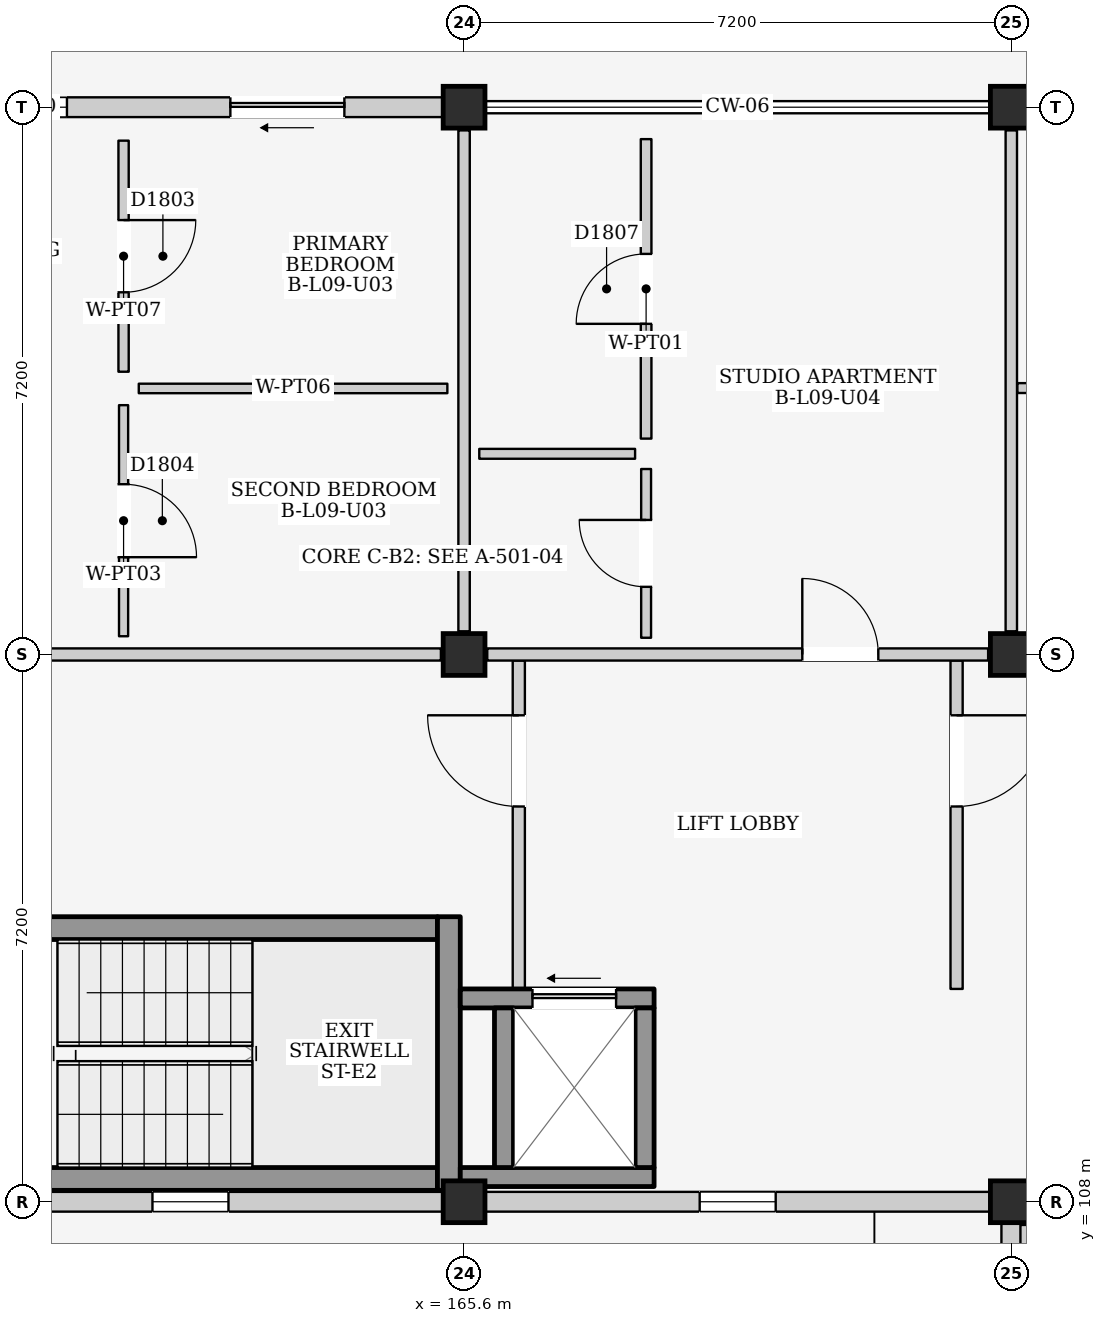
"""IFC4 building model, lengths in metres.
Left out: names, types, materials, properties, quantities, classifications, styles, units other than length and angle.
Written with IfcOpenShell. Run it as: python <this file> out.ifc"""

import sys

from ifc_helpers import new_model, si_unit, direction, frame, frame_2d, origin, origin_2d, place, context, subcontext, project, spatial, rectangle, extrude, element, fill, save


model = new_model("IFC4")
c1 = context("Model", 3, precision=1e-05, world=origin(), true_north=direction((0.0, 1.0)))
c2 = subcontext(c1, "Body", "Model", "MODEL_VIEW")
j1 = project(units=[si_unit("LENGTHUNIT", "METRE"), si_unit("PLANEANGLEUNIT", "RADIAN")], contexts=[c1])
p1 = place(None, origin())
s1 = spatial("IfcSite", under=j1, at=p1, CompositionType="ELEMENT")
p2 = place(p1, origin())
s2 = spatial("IfcBuilding", under=s1, at=p2, CompositionType="ELEMENT")
p3 = place(p2, frame((0.0, 0.0, 31.5)))
s3 = spatial("IfcBuildingStorey", under=s2, at=p3, CompositionType="ELEMENT", Elevation=31.5)
for number, where, z_axis, x_axis in (
    (1, (165.6, 108.0, 0.0), (0.0, 0.0, 1.0), (1.0, 0.0, 0.0)),
    (2, (165.6, 115.2, 0.0), (0.0, 0.0, 1.0), (1.0, 0.0, 0.0)),
    (3, (165.6, 122.4, 0.0), (0.0, 0.0, 1.0), (1.0, 0.0, 0.0)),
    (4, (172.8, 108.0, 0.0), (0.0, 0.0, 1.0), (1.0, 0.0, 0.0)),
    (5, (172.8, 115.2, 0.0), (0.0, 0.0, 1.0), (1.0, 0.0, 0.0)),
    (6, (172.8, 122.4, 0.0), (0.0, 0.0, 1.0), (1.0, 0.0, 0.0)),
):
    element("IfcColumn", number, at=place(p3, frame(where, z_axis=z_axis, x_axis=x_axis)), inside=s3, PredefinedType="COLUMN", context=c2, shape_type="SweptSolid", body=[
        extrude(rectangle(XDim=0.55, YDim=0.55, at=origin_2d()), origin(), (0.0, 0.0, 1.0), 3.3),
    ])
p4 = place(p3, frame((158.675, 108.0, 0.0), z_axis=(0.0, 0.0, 1.0), x_axis=(1.0, 0.0, 0.0)))
e7 = element("IfcWall", 7, at=p4, inside=s3, PredefinedType="ELEMENTEDWALL", context=c2, shape_type="SweptSolid", body=[
    extrude(rectangle(XDim=6.65, YDim=0.26, at=frame_2d((3.325, 0.0))), origin(), (0.0, 0.0, 1.0), 2.465),
])
p5 = place(p4, frame((2.825, 0.0, 1.2)))
e8 = element("IfcOpeningElement", 8, at=p5, cuts=e7, PredefinedType="OPENING", context=c2, shape_type="SweptSolid", body=[
    extrude(rectangle(XDim=1.0, YDim=0.9, at=frame_2d((0.5, 0.45))), frame((0.0, 0.145, 0.0), z_axis=(0.0, -1.0, 0.0), x_axis=(1.0, 0.0, 0.0)), (0.0, 0.0, 1.0), 0.29),
])
p6 = place(p3, frame((158.675, 122.4, 0.0), z_axis=(0.0, 0.0, 1.0), x_axis=(1.0, 0.0, 0.0)))
e9 = element("IfcWall", 9, at=p6, inside=s3, PredefinedType="ELEMENTEDWALL", context=c2, shape_type="SweptSolid", body=[
    extrude(rectangle(XDim=6.65, YDim=0.26, at=frame_2d((3.325, 0.0))), origin(), (0.0, 0.0, 1.0), 2.615),
])
p7 = place(p6, frame((3.85, 0.0, 0.0)))
e10 = element("IfcOpeningElement", 10, at=p7, cuts=e9, PredefinedType="OPENING", context=c2, shape_type="SweptSolid", body=[
    extrude(rectangle(XDim=1.5, YDim=2.12, at=frame_2d((0.75, 1.06))), frame((0.0, 0.145, 0.0), z_axis=(0.0, -1.0, 0.0), x_axis=(1.0, 0.0, 0.0)), (0.0, 0.0, 1.0), 0.29),
])
p8 = place(p6, frame((0.55, 0.0, 0.9)))
e11 = element("IfcOpeningElement", 11, at=p8, cuts=e9, PredefinedType="OPENING", context=c2, shape_type="SweptSolid", body=[
    extrude(rectangle(XDim=1.15, YDim=1.15, at=frame_2d((0.575, 0.575))), frame((0.0, 0.145, 0.0), z_axis=(0.0, -1.0, 0.0), x_axis=(1.0, 0.0, 0.0)), (0.0, 0.0, 1.0), 0.29),
])
p9 = place(p3, frame((165.875, 108.0, 0.0), z_axis=(0.0, 0.0, 1.0), x_axis=(1.0, 0.0, 0.0)))
e12 = element("IfcWall", 12, at=p9, inside=s3, PredefinedType="ELEMENTEDWALL", context=c2, shape_type="SweptSolid", body=[
    extrude(rectangle(XDim=6.65, YDim=0.26, at=frame_2d((3.325, 0.0))), origin(), (0.0, 0.0, 1.0), 2.465),
])
p10 = place(p9, frame((2.825, 0.0, 1.2)))
e13 = element("IfcOpeningElement", 13, at=p10, cuts=e12, PredefinedType="OPENING", context=c2, shape_type="SweptSolid", body=[
    extrude(rectangle(XDim=1.0, YDim=0.9, at=frame_2d((0.5, 0.45))), frame((0.0, 0.145, 0.0), z_axis=(0.0, -1.0, 0.0), x_axis=(1.0, 0.0, 0.0)), (0.0, 0.0, 1.0), 0.29),
])
p11 = place(p3, frame((172.8, 101.075, 0.0), z_axis=(0.0, 0.0, 1.0), x_axis=(0.0, 1.0, 0.0)))
e14 = element("IfcWall", 14, at=p11, inside=s3, PredefinedType="ELEMENTEDWALL", context=c2, shape_type="SweptSolid", body=[
    extrude(rectangle(XDim=6.65, YDim=0.26, at=frame_2d((3.325, 0.0))), origin(), (0.0, 0.0, 1.0), 2.565),
])
p12 = place(p11, frame((2.5, 0.0, 0.0)))
e15 = element("IfcOpeningElement", 15, at=p12, cuts=e14, PredefinedType="OPENING", context=c2, shape_type="SweptSolid", body=[
    extrude(rectangle(XDim=1.4, YDim=2.1, at=frame_2d((0.7, 1.05))), frame((0.0, 0.145, 0.0), z_axis=(0.0, -1.0, 0.0), x_axis=(1.0, 0.0, 0.0)), (0.0, 0.0, 1.0), 0.29),
])
p13 = place(p3, frame((158.75, 108.3, 0.0), z_axis=(0.0, 0.0, 1.0), x_axis=(1.0, 0.0, 0.0)))
e16 = element("IfcWall", 16, at=p13, inside=s3, PredefinedType="SHEAR", context=c2, shape_type="SweptSolid", body=[
    extrude(rectangle(XDim=6.5, YDim=0.3, at=frame_2d((3.25, 0.0))), origin(), (0.0, 0.0, 1.0), 3.08),
])
p14 = place(p3, frame((158.75, 111.6, 0.0), z_axis=(0.0, 0.0, 1.0), x_axis=(1.0, 0.0, 0.0)))
e17 = element("IfcWall", 17, at=p14, inside=s3, PredefinedType="SHEAR", context=c2, shape_type="SweptSolid", body=[
    extrude(rectangle(XDim=6.5, YDim=0.3, at=frame_2d((3.25, 0.0))), origin(), (0.0, 0.0, 1.0), 3.08),
])
p15 = place(p14, frame((0.18, 0.0, 0.0)))
e18 = element("IfcOpeningElement", 18, at=p15, cuts=e17, PredefinedType="OPENING", context=c2, shape_type="SweptSolid", body=[
    extrude(rectangle(XDim=1.15, YDim=2.2, at=frame_2d((0.575, 1.1))), frame((0.0, 0.165, 0.0), z_axis=(0.0, -1.0, 0.0), x_axis=(1.0, 0.0, 0.0)), (0.0, 0.0, 1.0), 0.33),
])
p16 = place(p3, frame((165.4, 108.15, 0.0), z_axis=(0.0, 0.0, 1.0), x_axis=(0.0, 1.0, 0.0)))
e19 = element("IfcWall", 19, at=p16, inside=s3, PredefinedType="SHEAR", context=c2, shape_type="SweptSolid", body=[
    extrude(rectangle(XDim=3.6, YDim=0.3, at=frame_2d((1.8, 0.0))), origin(), (0.0, 0.0, 1.0), 3.08),
])
p17 = place(p3, frame((166.32, 110.8, 0.0), z_axis=(0.0, 0.0, 1.0), x_axis=(0.0, 1.0, 0.0)))
e20 = element("IfcWall", 20, at=p17, inside=s3, PredefinedType="PARTITIONING", context=c2, shape_type="SweptSolid", body=[
    extrude(rectangle(XDim=4.32, YDim=0.16, at=frame_2d((2.16, 0.0))), origin(), (0.0, 0.0, 1.0), 3.08),
])
p18 = place(p17, frame((2.4, 0.0, 0.0)))
e21 = element("IfcOpeningElement", 21, at=p18, cuts=e20, PredefinedType="OPENING", context=c2, shape_type="SweptSolid", body=[
    extrude(rectangle(XDim=1.2, YDim=2.2, at=frame_2d((0.6, 1.1))), frame((0.0, 0.095, 0.0), z_axis=(0.0, -1.0, 0.0), x_axis=(1.0, 0.0, 0.0)), (0.0, 0.0, 1.0), 0.19),
])
p19 = place(p3, frame((172.08, 110.8, 0.0), z_axis=(0.0, 0.0, 1.0), x_axis=(0.0, 1.0, 0.0)))
e22 = element("IfcWall", 22, at=p19, inside=s3, PredefinedType="PARTITIONING", context=c2, shape_type="SweptSolid", body=[
    extrude(rectangle(XDim=4.32, YDim=0.16, at=frame_2d((2.16, 0.0))), origin(), (0.0, 0.0, 1.0), 3.08),
])
p20 = place(p19, frame((2.4, 0.0, 0.0)))
e23 = element("IfcOpeningElement", 23, at=p20, cuts=e22, PredefinedType="OPENING", context=c2, shape_type="SweptSolid", body=[
    extrude(rectangle(XDim=1.2, YDim=2.2, at=frame_2d((0.6, 1.1))), frame((0.0, 0.095, 0.0), z_axis=(0.0, -1.0, 0.0), x_axis=(1.0, 0.0, 0.0)), (0.0, 0.0, 1.0), 0.19),
])
p21 = place(p3, frame((165.55, 108.325, 0.0), z_axis=(0.0, 0.0, 1.0), x_axis=(1.0, 0.0, 0.0)))
e24 = element("IfcWall", 24, at=p21, inside=s3, PredefinedType="SHEAR", context=c2, shape_type="SweptSolid", body=[
    extrude(rectangle(XDim=2.55, YDim=0.25, at=frame_2d((1.275, 0.0))), origin(), (0.0, 0.0, 1.0), 3.08),
])
p22 = place(p3, frame((165.55, 110.675, 0.0), z_axis=(0.0, 0.0, 1.0), x_axis=(1.0, 0.0, 0.0)))
e25 = element("IfcWall", 25, at=p22, inside=s3, PredefinedType="SHEAR", context=c2, shape_type="SweptSolid", body=[
    extrude(rectangle(XDim=2.55, YDim=0.25, at=frame_2d((1.275, 0.0))), origin(), (0.0, 0.0, 1.0), 3.08),
])
p23 = place(p22, frame((0.95, 0.0, 0.0)))
e26 = element("IfcOpeningElement", 26, at=p23, cuts=e25, PredefinedType="OPENING", context=c2, shape_type="SweptSolid", body=[
    extrude(rectangle(XDim=1.1, YDim=2.15, at=frame_2d((0.55, 1.075))), frame((0.0, 0.14, 0.0), z_axis=(0.0, -1.0, 0.0), x_axis=(1.0, 0.0, 0.0)), (0.0, 0.0, 1.0), 0.28),
])
for number, where, z_axis, x_axis in (
    (27, (166.125, 108.45, 0.0), (0.0, 0.0, 1.0), (0.0, 1.0, 0.0)),
    (28, (167.975, 108.45, 0.0), (0.0, 0.0, 1.0), (0.0, 1.0, 0.0)),
):
    element("IfcWall", number, at=place(p3, frame(where, z_axis=z_axis, x_axis=x_axis)), inside=s3, PredefinedType="SHEAR", context=c2, shape_type="SweptSolid", body=[
        extrude(rectangle(XDim=2.1, YDim=0.25, at=frame_2d((1.05, 0.0))), origin(), (0.0, 0.0, 1.0), 3.08),
    ])
p24 = place(p3, frame((158.705, 115.2, 0.0), z_axis=(0.0, 0.0, 1.0), x_axis=(1.0, 0.0, 0.0)))
e29 = element("IfcWall", 29, at=p24, inside=s3, PredefinedType="PARTITIONING", context=c2, shape_type="SweptSolid", body=[
    extrude(rectangle(XDim=6.59, YDim=0.16, at=frame_2d((3.295, 0.0))), origin(), (0.0, 0.0, 1.0), 2.465),
])
p25 = place(p3, frame((165.6, 115.505, 0.0), z_axis=(0.0, 0.0, 1.0), x_axis=(0.0, 1.0, 0.0)))
e30 = element("IfcWall", 30, at=p25, inside=s3, PredefinedType="PARTITIONING", context=c2, shape_type="SweptSolid", body=[
    extrude(rectangle(XDim=6.59, YDim=0.15, at=frame_2d((3.295, 0.0))), origin(), (0.0, 0.0, 1.0), 2.565),
])
p26 = place(p3, frame((161.12, 118.92, 0.0), z_axis=(0.0, 0.0, 1.0), x_axis=(0.0, 1.0, 0.0)))
e31 = element("IfcWall", 31, at=p26, inside=s3, PredefinedType="PARTITIONING", context=c2, shape_type="SweptSolid", body=[
    extrude(rectangle(XDim=3.04, YDim=0.135, at=frame_2d((1.52, 0.0))), origin(), (0.0, 0.0, 1.0), 3.08),
])
p27 = place(p26, frame((1.045, 0.0, 0.0)))
e32 = element("IfcOpeningElement", 32, at=p27, cuts=e31, PredefinedType="OPENING", context=c2, shape_type="SweptSolid", body=[
    extrude(rectangle(XDim=0.95, YDim=2.15, at=frame_2d((0.475, 1.075))), frame((0.0, 0.083, 0.0), z_axis=(0.0, -1.0, 0.0), x_axis=(1.0, 0.0, 0.0)), (0.0, 0.0, 1.0), 0.165),
])
p28 = place(p3, frame((161.32, 118.7, 0.0), z_axis=(0.0, 0.0, 1.0), x_axis=(1.0, 0.0, 0.0)))
e33 = element("IfcWall", 33, at=p28, inside=s3, PredefinedType="PARTITIONING", context=c2, shape_type="SweptSolid", body=[
    extrude(rectangle(XDim=4.06, YDim=0.125, at=frame_2d((2.03, 0.0))), origin(), (0.0, 0.0, 1.0), 3.08),
])
p29 = place(p3, frame((161.12, 115.44, 0.0), z_axis=(0.0, 0.0, 1.0), x_axis=(0.0, 1.0, 0.0)))
e34 = element("IfcWall", 34, at=p29, inside=s3, PredefinedType="PARTITIONING", context=c2, shape_type="SweptSolid", body=[
    extrude(rectangle(XDim=3.04, YDim=0.12, at=frame_2d((1.52, 0.0))), origin(), (0.0, 0.0, 1.0), 3.08),
])
p30 = place(p29, frame((1.04, 0.0, 0.0)))
e35 = element("IfcOpeningElement", 35, at=p30, cuts=e34, PredefinedType="OPENING", context=c2, shape_type="SweptSolid", body=[
    extrude(rectangle(XDim=0.96, YDim=2.15, at=frame_2d((0.48, 1.075))), frame((0.0, 0.075, 0.0), z_axis=(0.0, -1.0, 0.0), x_axis=(1.0, 0.0, 0.0)), (0.0, 0.0, 1.0), 0.15),
])
p31 = place(p3, frame((165.905, 115.2, 0.0), z_axis=(0.0, 0.0, 1.0), x_axis=(1.0, 0.0, 0.0)))
e36 = element("IfcWall", 36, at=p31, inside=s3, PredefinedType="PARTITIONING", context=c2, shape_type="SweptSolid", body=[
    extrude(rectangle(XDim=6.59, YDim=0.16, at=frame_2d((3.295, 0.0))), origin(), (0.0, 0.0, 1.0), 2.465),
])
p32 = place(p31, frame((4.145, 0.0, 0.0)))
e37 = element("IfcOpeningElement", 37, at=p32, cuts=e36, PredefinedType="OPENING", context=c2, shape_type="SweptSolid", body=[
    extrude(rectangle(XDim=1.0, YDim=2.15, at=frame_2d((0.5, 1.075))), frame((0.0, 0.095, 0.0), z_axis=(0.0, -1.0, 0.0), x_axis=(1.0, 0.0, 0.0)), (0.0, 0.0, 1.0), 0.19),
])
p33 = place(p3, frame((172.8, 115.505, 0.0), z_axis=(0.0, 0.0, 1.0), x_axis=(0.0, 1.0, 0.0)))
e38 = element("IfcWall", 38, at=p33, inside=s3, PredefinedType="PARTITIONING", context=c2, shape_type="SweptSolid", body=[
    extrude(rectangle(XDim=6.59, YDim=0.15, at=frame_2d((3.295, 0.0))), origin(), (0.0, 0.0, 1.0), 2.565),
])
p34 = place(p3, frame((165.8, 117.84, 0.0), z_axis=(0.0, 0.0, 1.0), x_axis=(1.0, 0.0, 0.0)))
e39 = element("IfcWall", 39, at=p34, inside=s3, PredefinedType="PARTITIONING", context=c2, shape_type="SweptSolid", body=[
    extrude(rectangle(XDim=2.05, YDim=0.13, at=frame_2d((1.025, 0.0))), origin(), (0.0, 0.0, 1.0), 3.08),
])
p35 = place(p3, frame((167.995, 115.42, 0.0), z_axis=(0.0, 0.0, 1.0), x_axis=(0.0, 1.0, 0.0)))
e40 = element("IfcWall", 40, at=p35, inside=s3, PredefinedType="PARTITIONING", context=c2, shape_type="SweptSolid", body=[
    extrude(rectangle(XDim=2.22, YDim=0.13, at=frame_2d((1.11, 0.0))), origin(), (0.0, 0.0, 1.0), 3.08),
])
p36 = place(p35, frame((0.67, 0.0, 0.0)))
e41 = element("IfcOpeningElement", 41, at=p36, cuts=e40, PredefinedType="OPENING", context=c2, shape_type="SweptSolid", body=[
    extrude(rectangle(XDim=0.88, YDim=2.1, at=frame_2d((0.44, 1.05))), frame((0.0, 0.08, 0.0), z_axis=(0.0, -1.0, 0.0), x_axis=(1.0, 0.0, 0.0)), (0.0, 0.0, 1.0), 0.16),
])
p37 = place(p3, frame((167.995, 118.04, 0.0), z_axis=(0.0, 0.0, 1.0), x_axis=(0.0, 1.0, 0.0)))
e42 = element("IfcWall", 42, at=p37, inside=s3, PredefinedType="PARTITIONING", context=c2, shape_type="SweptSolid", body=[
    extrude(rectangle(XDim=3.94, YDim=0.14, at=frame_2d((1.97, 0.0))), origin(), (0.0, 0.0, 1.0), 3.08),
])
p38 = place(p37, frame((1.51, 0.0, 0.0)))
e43 = element("IfcOpeningElement", 43, at=p38, cuts=e42, PredefinedType="OPENING", context=c2, shape_type="SweptSolid", body=[
    extrude(rectangle(XDim=0.92, YDim=2.1, at=frame_2d((0.46, 1.05))), frame((0.0, 0.085, 0.0), z_axis=(0.0, -1.0, 0.0), x_axis=(1.0, 0.0, 0.0)), (0.0, 0.0, 1.0), 0.17),
])
p39 = place(p3, frame((172.88, 118.705, 0.0), z_axis=(0.0, 0.0, 1.0), x_axis=(1.0, 0.0, 0.0)))
e44 = element("IfcWall", 44, at=p39, inside=s3, PredefinedType="PARTITIONING", context=c2, shape_type="SweptSolid", body=[
    extrude(rectangle(XDim=2.4, YDim=0.13, at=frame_2d((1.2, 0.0))), origin(), (0.0, 0.0, 1.0), 3.08),
])
p40 = place(p39, frame((0.75, 0.0, 0.0)))
e45 = element("IfcOpeningElement", 45, at=p40, cuts=e44, PredefinedType="OPENING", context=c2, shape_type="SweptSolid", body=[
    extrude(rectangle(XDim=0.9, YDim=2.1, at=frame_2d((0.45, 1.05))), frame((0.0, 0.08, 0.0), z_axis=(0.0, -1.0, 0.0), x_axis=(1.0, 0.0, 0.0)), (0.0, 0.0, 1.0), 0.16),
])
p41 = place(p3, frame((173.0, 101.105, 0.0), z_axis=(0.0, 0.0, 1.0), x_axis=(0.0, 1.0, 0.0)))
e46 = element("IfcWall", 46, at=p41, inside=s3, PredefinedType="PARTITIONING", context=c2, shape_type="SweptSolid", body=[
    extrude(rectangle(XDim=6.59, YDim=0.16, at=frame_2d((3.295, 0.0))), origin(), (0.0, 0.0, 1.0), 3.08),
])
p42 = place(p41, frame((2.785, 0.0, 0.0)))
e47 = element("IfcOpeningElement", 47, at=p42, cuts=e46, PredefinedType="OPENING", context=c2, shape_type="SweptSolid", body=[
    extrude(rectangle(XDim=1.02, YDim=2.18, at=frame_2d((0.51, 1.09))), frame((0.0, 0.095, 0.0), z_axis=(0.0, -1.0, 0.0), x_axis=(1.0, 0.0, 0.0)), (0.0, 0.0, 1.0), 0.19),
])
p43 = place(p5, origin())
e48 = element("IfcWindow", 48, at=p43, inside=s3, PartitioningType="SINGLE_PANEL", PredefinedType="WINDOW", context=c2, shape_type="SweptSolid", body=[
    extrude(rectangle(XDim=1.0, YDim=0.9, at=frame_2d((0.5, 0.45))), frame((0.0, 0.03, 0.0), z_axis=(0.0, -1.0, 0.0), x_axis=(1.0, 0.0, 0.0)), (0.0, 0.0, 1.0), 0.06),
])
fill(e8, e48)
p44 = place(p7, frame((1.5, 0.0, 0.0), z_axis=(0.0, 0.0, 1.0), x_axis=(-1.0, 0.0, 0.0)))
e49 = element("IfcDoor", 49, at=p44, inside=s3, OperationType="SLIDING_TO_LEFT", PredefinedType="DOOR", context=c2, shape_type="SweptSolid", body=[
    extrude(rectangle(XDim=1.5, YDim=2.12, at=frame_2d((0.75, 1.06))), frame((0.0, 0.025, 0.0), z_axis=(0.0, -1.0, 0.0), x_axis=(1.0, 0.0, 0.0)), (0.0, 0.0, 1.0), 0.05),
])
fill(e10, e49)
p45 = place(p8, origin())
e50 = element("IfcWindow", 50, at=p45, inside=s3, PartitioningType="SINGLE_PANEL", PredefinedType="WINDOW", context=c2, shape_type="SweptSolid", body=[
    extrude(rectangle(XDim=1.15, YDim=1.15, at=frame_2d((0.575, 0.575))), frame((0.0, 0.03, 0.0), z_axis=(0.0, -1.0, 0.0), x_axis=(1.0, 0.0, 0.0)), (0.0, 0.0, 1.0), 0.06),
])
fill(e11, e50)
p46 = place(p10, origin())
e51 = element("IfcWindow", 51, at=p46, inside=s3, PartitioningType="SINGLE_PANEL", PredefinedType="WINDOW", context=c2, shape_type="SweptSolid", body=[
    extrude(rectangle(XDim=1.0, YDim=0.9, at=frame_2d((0.5, 0.45))), frame((0.0, 0.03, 0.0), z_axis=(0.0, -1.0, 0.0), x_axis=(1.0, 0.0, 0.0)), (0.0, 0.0, 1.0), 0.06),
])
fill(e13, e51)
p47 = place(p18, origin())
e52 = element("IfcDoor", 52, at=p47, inside=s3, OperationType="SINGLE_SWING_RIGHT", PredefinedType="DOOR", context=c2, shape_type="SweptSolid", body=[
    extrude(rectangle(XDim=1.2, YDim=2.2, at=frame_2d((0.6, 1.1))), frame((0.0, 0.025, 0.0), z_axis=(0.0, -1.0, 0.0), x_axis=(1.0, 0.0, 0.0)), (0.0, 0.0, 1.0), 0.05),
])
fill(e21, e52)
p48 = place(p20, frame((1.2, 0.0, 0.0), z_axis=(0.0, 0.0, 1.0), x_axis=(-1.0, 0.0, 0.0)))
e53 = element("IfcDoor", 53, at=p48, inside=s3, OperationType="SINGLE_SWING_LEFT", PredefinedType="DOOR", context=c2, shape_type="SweptSolid", body=[
    extrude(rectangle(XDim=1.2, YDim=2.2, at=frame_2d((0.6, 1.1))), frame((0.0, 0.025, 0.0), z_axis=(0.0, -1.0, 0.0), x_axis=(1.0, 0.0, 0.0)), (0.0, 0.0, 1.0), 0.05),
])
fill(e23, e53)
p49 = place(p23, origin())
e54 = element("IfcDoor", 54, at=p49, inside=s3, OperationType="SLIDING_TO_LEFT", PredefinedType="DOOR", context=c2, shape_type="SweptSolid", body=[
    extrude(rectangle(XDim=1.1, YDim=2.15, at=frame_2d((0.55, 1.075))), frame((0.0, 0.025, 0.0), z_axis=(0.0, -1.0, 0.0), x_axis=(1.0, 0.0, 0.0)), (0.0, 0.0, 1.0), 0.05),
])
fill(e26, e54)
p50 = place(p27, frame((0.95, 0.0, 0.0), z_axis=(0.0, 0.0, 1.0), x_axis=(-1.0, 0.0, 0.0)))
e55 = element("IfcDoor", 55, at=p50, inside=s3, OperationType="SINGLE_SWING_LEFT", PredefinedType="DOOR", context=c2, shape_type="SweptSolid", body=[
    extrude(rectangle(XDim=0.95, YDim=2.15, at=frame_2d((0.475, 1.075))), frame((0.0, 0.025, 0.0), z_axis=(0.0, -1.0, 0.0), x_axis=(1.0, 0.0, 0.0)), (0.0, 0.0, 1.0), 0.05),
])
fill(e32, e55)
p51 = place(p30, frame((0.96, 0.0, 0.0), z_axis=(0.0, 0.0, 1.0), x_axis=(-1.0, 0.0, 0.0)))
e56 = element("IfcDoor", 56, at=p51, inside=s3, OperationType="SINGLE_SWING_RIGHT", PredefinedType="DOOR", context=c2, shape_type="SweptSolid", body=[
    extrude(rectangle(XDim=0.96, YDim=2.15, at=frame_2d((0.48, 1.075))), frame((0.0, 0.025, 0.0), z_axis=(0.0, -1.0, 0.0), x_axis=(1.0, 0.0, 0.0)), (0.0, 0.0, 1.0), 0.05),
])
fill(e35, e56)
p52 = place(p32, origin())
e57 = element("IfcDoor", 57, at=p52, inside=s3, OperationType="SINGLE_SWING_LEFT", PredefinedType="DOOR", context=c2, shape_type="SweptSolid", body=[
    extrude(rectangle(XDim=1.0, YDim=2.15, at=frame_2d((0.5, 1.075))), frame((0.0, 0.025, 0.0), z_axis=(0.0, -1.0, 0.0), x_axis=(1.0, 0.0, 0.0)), (0.0, 0.0, 1.0), 0.05),
])
fill(e37, e57)
p53 = place(p36, origin())
e58 = element("IfcDoor", 58, at=p53, inside=s3, OperationType="SINGLE_SWING_RIGHT", PredefinedType="DOOR", context=c2, shape_type="SweptSolid", body=[
    extrude(rectangle(XDim=0.88, YDim=2.1, at=frame_2d((0.44, 1.05))), frame((0.0, 0.025, 0.0), z_axis=(0.0, -1.0, 0.0), x_axis=(1.0, 0.0, 0.0)), (0.0, 0.0, 1.0), 0.05),
])
fill(e41, e58)
p54 = place(p38, origin())
e59 = element("IfcDoor", 59, at=p54, inside=s3, OperationType="SINGLE_SWING_LEFT", PredefinedType="DOOR", context=c2, shape_type="SweptSolid", body=[
    extrude(rectangle(XDim=0.92, YDim=2.1, at=frame_2d((0.46, 1.05))), frame((0.0, 0.025, 0.0), z_axis=(0.0, -1.0, 0.0), x_axis=(1.0, 0.0, 0.0)), (0.0, 0.0, 1.0), 0.05),
])
fill(e43, e59)
save(model, sys.argv[1])
